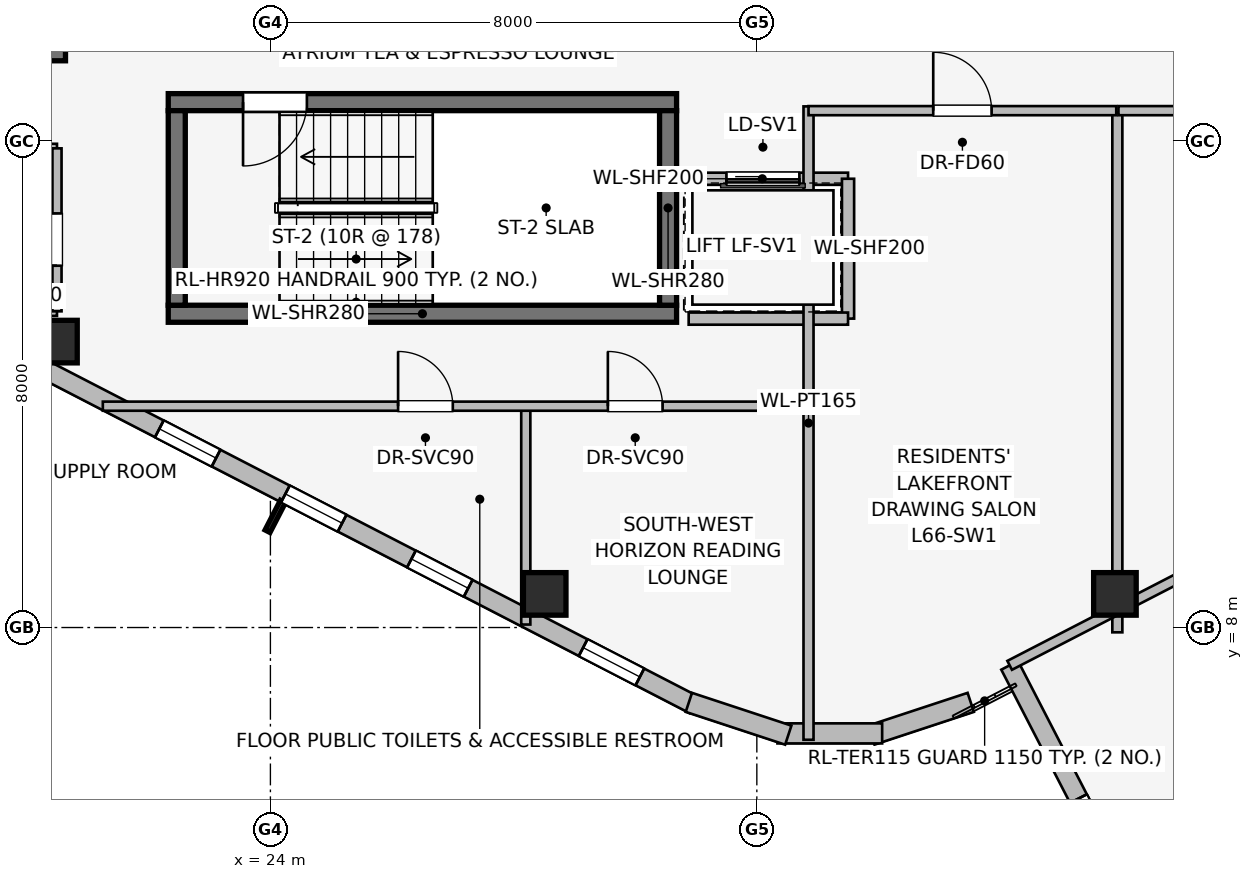
"""IFC4 building model, lengths in metres.
Left out: names, types, materials, properties, quantities, classifications, styles, units other than length and angle.
Written with IfcOpenShell. Run it as: python <this file> out.ifc"""

import sys

from ifc_helpers import new_model, si_unit, direction, frame, frame_2d, origin, origin_2d, place, context, subcontext, project, spatial, rectangle, extrude, element, fill, save


model = new_model("IFC4")
c1 = context("Model", 3, precision=1e-05, world=origin(), true_north=direction((0.0, 1.0)))
c2 = subcontext(c1, "Body", "Model", "MODEL_VIEW")
j1 = project(units=[si_unit("LENGTHUNIT", "METRE"), si_unit("PLANEANGLEUNIT", "RADIAN")], contexts=[c1])
p1 = place(None, origin())
s1 = spatial("IfcSite", under=j1, at=p1, CompositionType="ELEMENT")
p2 = place(p1, origin())
s2 = spatial("IfcBuilding", under=s1, at=p2, CompositionType="ELEMENT")
p3 = place(p2, frame((0.0, 0.0, 241.9)))
s3 = spatial("IfcBuildingStorey", under=s2, at=p3, CompositionType="ELEMENT", Elevation=241.9)
p4 = place(p3, frame((16.87, 17.46, 0.0), z_axis=(0.0, 0.0, 1.0), x_axis=(1.0, 0.0, 0.0)))
e1 = element("IfcWall", 1, at=p4, inside=s3, PredefinedType="SHEAR", context=c2, shape_type="SweptSolid", body=[
    extrude(rectangle(XDim=3.76, YDim=0.28, at=frame_2d((1.88, 0.0))), origin(), (0.0, 0.0, 1.0), 3.55),
])
p5 = place(p3, frame((22.32, 13.16, 0.0), z_axis=(0.0, 0.0, 1.0), x_axis=(1.0, 0.0, 0.0)))
e2 = element("IfcWall", 2, at=p5, inside=s3, PredefinedType="SHEAR", context=c2, shape_type="SweptSolid", body=[
    extrude(rectangle(XDim=8.36, YDim=0.28, at=frame_2d((4.18, 0.0))), origin(), (0.0, 0.0, 1.0), 3.55),
])
p6 = place(p3, frame((30.68, 16.64, 0.0), z_axis=(0.0, 0.0, 1.0), x_axis=(-1.0, 0.0, 0.0)))
e3 = element("IfcWall", 3, at=p6, inside=s3, PredefinedType="SHEAR", context=c2, shape_type="SweptSolid", body=[
    extrude(rectangle(XDim=8.36, YDim=0.28, at=frame_2d((4.18, 0.0))), origin(), (0.0, 0.0, 1.0), 3.55),
])
p7 = place(p6, frame((6.08, 0.0, 0.0)))
e4 = element("IfcOpeningElement", 4, at=p7, cuts=e3, PredefinedType="OPENING", context=c2, shape_type="SweptSolid", body=[
    extrude(rectangle(XDim=1.05, YDim=2.0, at=frame_2d((0.525, 1.0))), frame((0.0, 0.15, 0.0), z_axis=(0.0, -1.0, 0.0), x_axis=(1.0, 0.0, 0.0)), (0.0, 0.0, 1.0), 0.3),
])
for number, where, z_axis, x_axis in (
    (5, (22.46, 16.5, 0.0), (0.0, 0.0, 1.0), (0.0, -1.0, 0.0)),
    (6, (30.54, 13.3, 0.0), (0.0, 0.0, 1.0), (0.0, 1.0, 0.0)),
):
    element("IfcWall", number, at=place(p3, frame(where, z_axis=z_axis, x_axis=x_axis)), inside=s3, PredefinedType="SHEAR", context=c2, shape_type="SweptSolid", body=[
        extrude(rectangle(XDim=3.2, YDim=0.28, at=frame_2d((1.6, 0.0))), origin(), (0.0, 0.0, 1.0), 3.55),
    ])
for number, where, z_axis, x_axis in (
    (7, (20.473, 12.702, 0.0), (0.0, 0.0, 1.0), (1.0, 0.0, 0.0)),
    (8, (28.511, 8.553, 0.0), (0.0, 0.0, 1.0), (1.0, 0.0, 0.0)),
    (9, (37.889, 8.553, 0.0), (0.0, 0.0, 1.0), (1.0, 0.0, 0.0)),
):
    element("IfcColumn", number, at=place(p3, frame(where, z_axis=z_axis, x_axis=x_axis)), inside=s3, PredefinedType="COLUMN", context=c2, shape_type="SweptSolid", body=[
        extrude(rectangle(XDim=0.7, YDim=0.7, at=origin_2d()), origin(), (0.0, 0.0, 1.0), 3.55),
    ])
p8 = place(p3, frame((30.963, 6.73, 0.0), z_axis=(0.0, 0.0, 1.0), x_axis=(-0.888581481622, 0.458718814218, 0.0)))
e10 = element("IfcWall", 10, at=p8, inside=s3, PredefinedType="STANDARD", context=c2, shape_type="SweptSolid", body=[
    extrude(rectangle(XDim=15.077, YDim=0.31, at=frame_2d((7.539, 0.0))), origin(), (0.0, 0.0, 1.0), 3.29),
])
p9 = place(p8, frame((0.998, 0.0, 0.75)))
e11 = element("IfcOpeningElement", 11, at=p9, cuts=e10, PredefinedType="OPENING", context=c2, shape_type="SweptSolid", body=[
    extrude(rectangle(XDim=1.05, YDim=1.4, at=frame_2d((0.525, 0.7))), frame((0.0, 0.165, 0.0), z_axis=(0.0, -1.0, 0.0), x_axis=(1.0, 0.0, 0.0)), (0.0, 0.0, 1.0), 0.33),
])
p10 = place(p8, frame((4.176, 0.0, 0.75)))
e12 = element("IfcOpeningElement", 12, at=p10, cuts=e10, PredefinedType="OPENING", context=c2, shape_type="SweptSolid", body=[
    extrude(rectangle(XDim=1.05, YDim=1.4, at=frame_2d((0.525, 0.7))), frame((0.0, 0.165, 0.0), z_axis=(0.0, -1.0, 0.0), x_axis=(1.0, 0.0, 0.0)), (0.0, 0.0, 1.0), 0.33),
])
p11 = place(p8, frame((6.509, 0.0, 0.75)))
e13 = element("IfcOpeningElement", 13, at=p11, cuts=e10, PredefinedType="OPENING", context=c2, shape_type="SweptSolid", body=[
    extrude(rectangle(XDim=1.05, YDim=1.4, at=frame_2d((0.525, 0.7))), frame((0.0, 0.165, 0.0), z_axis=(0.0, -1.0, 0.0), x_axis=(1.0, 0.0, 0.0)), (0.0, 0.0, 1.0), 0.33),
])
p12 = place(p8, frame((8.842, 0.0, 0.75)))
e14 = element("IfcOpeningElement", 14, at=p12, cuts=e10, PredefinedType="OPENING", context=c2, shape_type="SweptSolid", body=[
    extrude(rectangle(XDim=1.05, YDim=1.4, at=frame_2d((0.525, 0.7))), frame((0.0, 0.165, 0.0), z_axis=(0.0, -1.0, 0.0), x_axis=(1.0, 0.0, 0.0)), (0.0, 0.0, 1.0), 0.33),
])
p13 = place(p3, frame((35.518, 6.769, 0.0), z_axis=(0.0, 0.0, 1.0), x_axis=(-0.949713440491, -0.313120393699, 0.0)))
e15 = element("IfcWall", 15, at=p13, inside=s3, PredefinedType="STANDARD", context=c2, shape_type="SweptSolid", body=[
    extrude(rectangle(XDim=1.722, YDim=0.33, at=frame_2d((0.861, 0.0))), origin(), (0.0, 0.0, 1.0), 3.29),
])
p14 = place(p3, frame((34.061, 6.259, 0.0), z_axis=(0.0, 0.0, 1.0), x_axis=(-1.0, 0.0, 0.0)))
e16 = element("IfcWall", 16, at=p14, inside=s3, PredefinedType="STANDARD", context=c2, shape_type="SweptSolid", body=[
    extrude(rectangle(XDim=1.722, YDim=0.33, at=frame_2d((0.861, 0.0))), origin(), (0.0, 0.0, 1.0), 3.29),
])
p15 = place(p3, frame((32.517, 6.23, 0.0), z_axis=(0.0, 0.0, 1.0), x_axis=(-0.949713440491, 0.313120393699, 0.0)))
e17 = element("IfcWall", 17, at=p15, inside=s3, PredefinedType="STANDARD", context=c2, shape_type="SweptSolid", body=[
    extrude(rectangle(XDim=1.722, YDim=0.33, at=frame_2d((0.861, 0.0))), origin(), (0.0, 0.0, 1.0), 3.29),
])
p16 = place(p3, frame((45.241, -10.216, 0.0), z_axis=(0.0, 0.0, 1.0), x_axis=(-0.45873211625, 0.888574614493, 0.0)))
e18 = element("IfcWall", 18, at=p16, inside=s3, PredefinedType="STANDARD", context=c2, shape_type="SweptSolid", body=[
    extrude(rectangle(XDim=19.8, YDim=0.31, at=frame_2d((9.9, 0.0))), origin(), (0.0, 0.0, 1.0), 3.29),
])
p17 = place(p16, frame((2.467, 0.0, 0.75)))
e19 = element("IfcOpeningElement", 19, at=p17, cuts=e18, PredefinedType="OPENING", context=c2, shape_type="SweptSolid", body=[
    extrude(rectangle(XDim=2.4, YDim=1.6, at=frame_2d((1.2, 0.8))), frame((0.0, 0.165, 0.0), z_axis=(0.0, -1.0, 0.0), x_axis=(1.0, 0.0, 0.0)), (0.0, 0.0, 1.0), 0.33),
])
p18 = place(p16, frame((8.7, 0.0, 0.75)))
e20 = element("IfcOpeningElement", 20, at=p18, cuts=e18, PredefinedType="OPENING", context=c2, shape_type="SweptSolid", body=[
    extrude(rectangle(XDim=2.4, YDim=1.6, at=frame_2d((1.2, 0.8))), frame((0.0, 0.165, 0.0), z_axis=(0.0, -1.0, 0.0), x_axis=(1.0, 0.0, 0.0)), (0.0, 0.0, 1.0), 0.33),
])
p19 = place(p16, frame((14.934, 0.0, 0.75)))
e21 = element("IfcOpeningElement", 21, at=p19, cuts=e18, PredefinedType="OPENING", context=c2, shape_type="SweptSolid", body=[
    extrude(rectangle(XDim=2.4, YDim=1.6, at=frame_2d((1.2, 0.8))), frame((0.0, 0.165, 0.0), z_axis=(0.0, -1.0, 0.0), x_axis=(1.0, 0.0, 0.0)), (0.0, 0.0, 1.0), 0.33),
])
p20 = place(p3, frame((33.5, 15.38, 0.0), z_axis=(0.0, 0.0, 1.0), x_axis=(-1.0, 0.0, 0.0)))
e22 = element("IfcWall", 22, at=p20, inside=s3, PredefinedType="PARTITIONING", context=c2, shape_type="SweptSolid", body=[
    extrude(rectangle(XDim=2.82, YDim=0.2, at=frame_2d((1.41, 0.0))), origin(), (0.0, 0.0, 1.0), 3.29),
])
p21 = place(p20, frame((0.8, 0.0, 0.0)))
e23 = element("IfcOpeningElement", 23, at=p21, cuts=e22, PredefinedType="OPENING", context=c2, shape_type="SweptSolid", body=[
    extrude(rectangle(XDim=1.2, YDim=2.2, at=frame_2d((0.6, 1.1))), frame((0.0, 0.11, 0.0), z_axis=(0.0, -1.0, 0.0), x_axis=(1.0, 0.0, 0.0)), (0.0, 0.0, 1.0), 0.22),
])
p22 = place(p3, frame((33.5, 13.08, 0.0), z_axis=(0.0, 0.0, 1.0), x_axis=(0.0, 1.0, 0.0)))
e24 = element("IfcWall", 24, at=p22, inside=s3, PredefinedType="PARTITIONING", context=c2, shape_type="SweptSolid", body=[
    extrude(rectangle(XDim=2.3, YDim=0.2, at=frame_2d((1.15, 0.0))), origin(), (0.0, 0.0, 1.0), 3.29),
])
p23 = place(p3, frame((30.879, 13.08, 0.0), z_axis=(0.0, 0.0, 1.0), x_axis=(1.0, 0.0, 0.0)))
e25 = element("IfcWall", 25, at=p23, inside=s3, PredefinedType="PARTITIONING", context=c2, shape_type="SweptSolid", body=[
    extrude(rectangle(XDim=2.621, YDim=0.2, at=frame_2d((1.311, 0.0))), origin(), (0.0, 0.0, 1.0), 3.29),
])
for number, where, z_axis, x_axis in (
    (26, (18.6, 13.2, 0.0), (0.0, 0.0, 1.0), (1.0, 0.0, 0.0)),
    (27, (18.6, 15.88, 0.0), (0.0, 0.0, 1.0), (1.0, 0.0, 0.0)),
):
    element("IfcWall", number, at=place(p3, frame(where, z_axis=z_axis, x_axis=x_axis)), inside=s3, PredefinedType="PARTITIONING", context=c2, shape_type="SweptSolid", body=[
        extrude(rectangle(XDim=1.89, YDim=0.15, at=frame_2d((0.945, 0.0))), origin(), (0.0, 0.0, 1.0), 3.29),
    ])
p24 = place(p3, frame((20.49, 13.2, 0.0), z_axis=(0.0, 0.0, 1.0), x_axis=(0.0, 1.0, 0.0)))
e28 = element("IfcWall", 28, at=p24, inside=s3, PredefinedType="PARTITIONING", context=c2, shape_type="SweptSolid", body=[
    extrude(rectangle(XDim=2.68, YDim=0.15, at=frame_2d((1.34, 0.0))), origin(), (0.0, 0.0, 1.0), 3.29),
])
p25 = place(p24, frame((0.75, 0.0, 0.0)))
e29 = element("IfcOpeningElement", 29, at=p25, cuts=e28, PredefinedType="OPENING", context=c2, shape_type="SweptSolid", body=[
    extrude(rectangle(XDim=0.86, YDim=2.0, at=frame_2d((0.43, 1.0))), frame((0.0, 0.085, 0.0), z_axis=(0.0, -1.0, 0.0), x_axis=(1.0, 0.0, 0.0)), (0.0, 0.0, 1.0), 0.17),
])
p26 = place(p3, frame((32.85, 6.154, 0.0), z_axis=(0.0, 0.0, 1.0), x_axis=(0.0, 1.0, 0.0)))
e30 = element("IfcWall", 30, at=p26, inside=s3, PredefinedType="PARTITIONING", context=c2, shape_type="SweptSolid", body=[
    extrude(rectangle(XDim=10.416, YDim=0.165, at=frame_2d((5.208, 0.0))), origin(), (0.0, 0.0, 1.0), 3.29),
])
p27 = place(p3, frame((28.2, 8.049, 0.0), z_axis=(0.0, 0.0, 1.0), x_axis=(0.0, 1.0, 0.0)))
e31 = element("IfcWall", 31, at=p27, inside=s3, PredefinedType="PARTITIONING", context=c2, shape_type="SweptSolid", body=[
    extrude(rectangle(XDim=3.591, YDim=0.15, at=frame_2d((1.795, 0.0))), origin(), (0.0, 0.0, 1.0), 3.29),
])
p28 = place(p3, frame((21.244, 11.64, 0.0), z_axis=(0.0, 0.0, 1.0), x_axis=(1.0, 0.0, 0.0)))
e32 = element("IfcWall", 32, at=p28, inside=s3, PredefinedType="PARTITIONING", context=c2, shape_type="SweptSolid", body=[
    extrude(rectangle(XDim=11.606, YDim=0.15, at=frame_2d((5.803, 0.0))), origin(), (0.0, 0.0, 1.0), 3.29),
])
p29 = place(p28, frame((4.856, 0.0, 0.0)))
e33 = element("IfcOpeningElement", 33, at=p29, cuts=e32, PredefinedType="OPENING", context=c2, shape_type="SweptSolid", body=[
    extrude(rectangle(XDim=0.9, YDim=2.0, at=frame_2d((0.45, 1.0))), frame((0.0, 0.085, 0.0), z_axis=(0.0, -1.0, 0.0), x_axis=(1.0, 0.0, 0.0)), (0.0, 0.0, 1.0), 0.17),
])
p30 = place(p28, frame((8.306, 0.0, 0.0)))
e34 = element("IfcOpeningElement", 34, at=p30, cuts=e32, PredefinedType="OPENING", context=c2, shape_type="SweptSolid", body=[
    extrude(rectangle(XDim=0.9, YDim=2.0, at=frame_2d((0.45, 1.0))), frame((0.0, 0.085, 0.0), z_axis=(0.0, -1.0, 0.0), x_axis=(1.0, 0.0, 0.0)), (0.0, 0.0, 1.0), 0.17),
])
p31 = place(p3, frame((37.929, 7.921, 0.0), z_axis=(0.0, 0.0, 1.0), x_axis=(0.0, 1.0, 0.0)))
e35 = element("IfcWall", 35, at=p31, inside=s3, PredefinedType="PARTITIONING", context=c2, shape_type="SweptSolid", body=[
    extrude(rectangle(XDim=8.549, YDim=0.165, at=frame_2d((4.274, 0.0))), origin(), (0.0, 0.0, 1.0), 2.679),
])
p32 = place(p3, frame((32.85, 16.5, 0.0), z_axis=(0.0, 0.0, 1.0), x_axis=(1.0, 0.0, 0.0)))
e36 = element("IfcWall", 36, at=p32, inside=s3, PredefinedType="PARTITIONING", context=c2, shape_type="SweptSolid", body=[
    extrude(rectangle(XDim=5.061, YDim=0.15, at=frame_2d((2.53, 0.0))), origin(), (0.0, 0.0, 1.0), 3.29),
])
p33 = place(p32, frame((2.051, 0.0, 0.0)))
e37 = element("IfcOpeningElement", 37, at=p33, cuts=e36, PredefinedType="OPENING", context=c2, shape_type="SweptSolid", body=[
    extrude(rectangle(XDim=0.96, YDim=2.0, at=frame_2d((0.48, 1.0))), frame((0.0, 0.085, 0.0), z_axis=(0.0, -1.0, 0.0), x_axis=(1.0, 0.0, 0.0)), (0.0, 0.0, 1.0), 0.17),
])
p34 = place(p3, frame((37.947, 16.5, 0.0), z_axis=(0.0, 0.0, 1.0), x_axis=(1.0, 0.0, 0.0)))
e38 = element("IfcWall", 38, at=p34, inside=s3, PredefinedType="PARTITIONING", context=c2, shape_type="SweptSolid", body=[
    extrude(rectangle(XDim=3.513, YDim=0.15, at=frame_2d((1.756, 0.0))), origin(), (0.0, 0.0, 1.0), 3.29),
])
p35 = place(p34, frame((1.277, 0.0, 0.0)))
e39 = element("IfcOpeningElement", 39, at=p35, cuts=e38, PredefinedType="OPENING", context=c2, shape_type="SweptSolid", body=[
    extrude(rectangle(XDim=0.96, YDim=2.0, at=frame_2d((0.48, 1.0))), frame((0.0, 0.085, 0.0), z_axis=(0.0, -1.0, 0.0), x_axis=(1.0, 0.0, 0.0)), (0.0, 0.0, 1.0), 0.17),
])
p36 = place(p3, frame((36.158, 7.378, 0.0), z_axis=(0.0, 0.0, 1.0), x_axis=(0.88859001822, 0.458702277648, 0.0)))
e40 = element("IfcWall", 40, at=p36, inside=s3, PredefinedType="PARTITIONING", context=c2, shape_type="SweptSolid", body=[
    extrude(rectangle(XDim=13.201, YDim=0.165, at=frame_2d((6.6, 0.0))), origin(), (0.0, 0.0, 1.0), 2.741),
])
p37 = place(p36, frame((6.12, 0.0, 0.0)))
e41 = element("IfcOpeningElement", 41, at=p37, cuts=e40, PredefinedType="OPENING", context=c2, shape_type="SweptSolid", body=[
    extrude(rectangle(XDim=0.96, YDim=2.0, at=frame_2d((0.48, 1.0))), frame((0.0, 0.093, 0.0), z_axis=(0.0, -1.0, 0.0), x_axis=(1.0, 0.0, 0.0)), (0.0, 0.0, 1.0), 0.185),
])
p38 = place(p9, origin())
e42 = element("IfcWindow", 42, at=p38, inside=s3, PartitioningType="SINGLE_PANEL", PredefinedType="WINDOW", context=c2, shape_type="SweptSolid", body=[
    extrude(rectangle(XDim=1.05, YDim=1.4, at=frame_2d((0.525, 0.7))), frame((0.0, 0.03, 0.0), z_axis=(0.0, -1.0, 0.0), x_axis=(1.0, 0.0, 0.0)), (0.0, 0.0, 1.0), 0.06),
])
fill(e11, e42)
p39 = place(p10, origin())
e43 = element("IfcWindow", 43, at=p39, inside=s3, PartitioningType="SINGLE_PANEL", PredefinedType="WINDOW", context=c2, shape_type="SweptSolid", body=[
    extrude(rectangle(XDim=1.05, YDim=1.4, at=frame_2d((0.525, 0.7))), frame((0.0, 0.03, 0.0), z_axis=(0.0, -1.0, 0.0), x_axis=(1.0, 0.0, 0.0)), (0.0, 0.0, 1.0), 0.06),
])
fill(e12, e43)
p40 = place(p11, origin())
e44 = element("IfcWindow", 44, at=p40, inside=s3, PartitioningType="SINGLE_PANEL", PredefinedType="WINDOW", context=c2, shape_type="SweptSolid", body=[
    extrude(rectangle(XDim=1.05, YDim=1.4, at=frame_2d((0.525, 0.7))), frame((0.0, 0.03, 0.0), z_axis=(0.0, -1.0, 0.0), x_axis=(1.0, 0.0, 0.0)), (0.0, 0.0, 1.0), 0.06),
])
fill(e13, e44)
p41 = place(p12, origin())
e45 = element("IfcWindow", 45, at=p41, inside=s3, PartitioningType="SINGLE_PANEL", PredefinedType="WINDOW", context=c2, shape_type="SweptSolid", body=[
    extrude(rectangle(XDim=1.05, YDim=1.4, at=frame_2d((0.525, 0.7))), frame((0.0, 0.03, 0.0), z_axis=(0.0, -1.0, 0.0), x_axis=(1.0, 0.0, 0.0)), (0.0, 0.0, 1.0), 0.06),
])
fill(e14, e45)
p42 = place(p19, origin())
e46 = element("IfcWindow", 46, at=p42, inside=s3, PartitioningType="SINGLE_PANEL", PredefinedType="WINDOW", context=c2, shape_type="SweptSolid", body=[
    extrude(rectangle(XDim=2.4, YDim=1.6, at=frame_2d((1.2, 0.8))), frame((0.0, 0.03, 0.0), z_axis=(0.0, -1.0, 0.0), x_axis=(1.0, 0.0, 0.0)), (0.0, 0.0, 1.0), 0.06),
])
fill(e21, e46)
p43 = place(p7, origin())
e47 = element("IfcDoor", 47, at=p43, inside=s3, OperationType="SINGLE_SWING_RIGHT", PredefinedType="DOOR", context=c2, shape_type="SweptSolid", body=[
    extrude(rectangle(XDim=1.05, YDim=2.0, at=frame_2d((0.525, 1.0))), frame((0.0, 0.025, 0.0), z_axis=(0.0, -1.0, 0.0), x_axis=(1.0, 0.0, 0.0)), (0.0, 0.0, 1.0), 0.05),
])
fill(e4, e47)
p44 = place(p21, origin())
e48 = element("IfcDoor", 48, at=p44, inside=s3, OperationType="SLIDING_TO_RIGHT", PredefinedType="DOOR", context=c2, shape_type="SweptSolid", body=[
    extrude(rectangle(XDim=1.2, YDim=2.2, at=frame_2d((0.6, 1.1))), frame((0.0, 0.025, 0.0), z_axis=(0.0, -1.0, 0.0), x_axis=(1.0, 0.0, 0.0)), (0.0, 0.0, 1.0), 0.05),
])
fill(e23, e48)
p45 = place(p25, origin())
e49 = element("IfcDoor", 49, at=p45, inside=s3, OperationType="SINGLE_SWING_LEFT", PredefinedType="DOOR", context=c2, shape_type="SweptSolid", body=[
    extrude(rectangle(XDim=0.86, YDim=2.0, at=frame_2d((0.43, 1.0))), frame((0.0, 0.025, 0.0), z_axis=(0.0, -1.0, 0.0), x_axis=(1.0, 0.0, 0.0)), (0.0, 0.0, 1.0), 0.05),
])
fill(e29, e49)
p46 = place(p29, origin())
e50 = element("IfcDoor", 50, at=p46, inside=s3, OperationType="SINGLE_SWING_LEFT", PredefinedType="DOOR", context=c2, shape_type="SweptSolid", body=[
    extrude(rectangle(XDim=0.9, YDim=2.0, at=frame_2d((0.45, 1.0))), frame((0.0, 0.025, 0.0), z_axis=(0.0, -1.0, 0.0), x_axis=(1.0, 0.0, 0.0)), (0.0, 0.0, 1.0), 0.05),
])
fill(e33, e50)
p47 = place(p30, origin())
e51 = element("IfcDoor", 51, at=p47, inside=s3, OperationType="SINGLE_SWING_LEFT", PredefinedType="DOOR", context=c2, shape_type="SweptSolid", body=[
    extrude(rectangle(XDim=0.9, YDim=2.0, at=frame_2d((0.45, 1.0))), frame((0.0, 0.025, 0.0), z_axis=(0.0, -1.0, 0.0), x_axis=(1.0, 0.0, 0.0)), (0.0, 0.0, 1.0), 0.05),
])
fill(e34, e51)
p48 = place(p33, origin())
e52 = element("IfcDoor", 52, at=p48, inside=s3, OperationType="SINGLE_SWING_LEFT", PredefinedType="DOOR", context=c2, shape_type="SweptSolid", body=[
    extrude(rectangle(XDim=0.96, YDim=2.0, at=frame_2d((0.48, 1.0))), frame((0.0, 0.025, 0.0), z_axis=(0.0, -1.0, 0.0), x_axis=(1.0, 0.0, 0.0)), (0.0, 0.0, 1.0), 0.05),
])
fill(e37, e52)
save(model, sys.argv[1])
